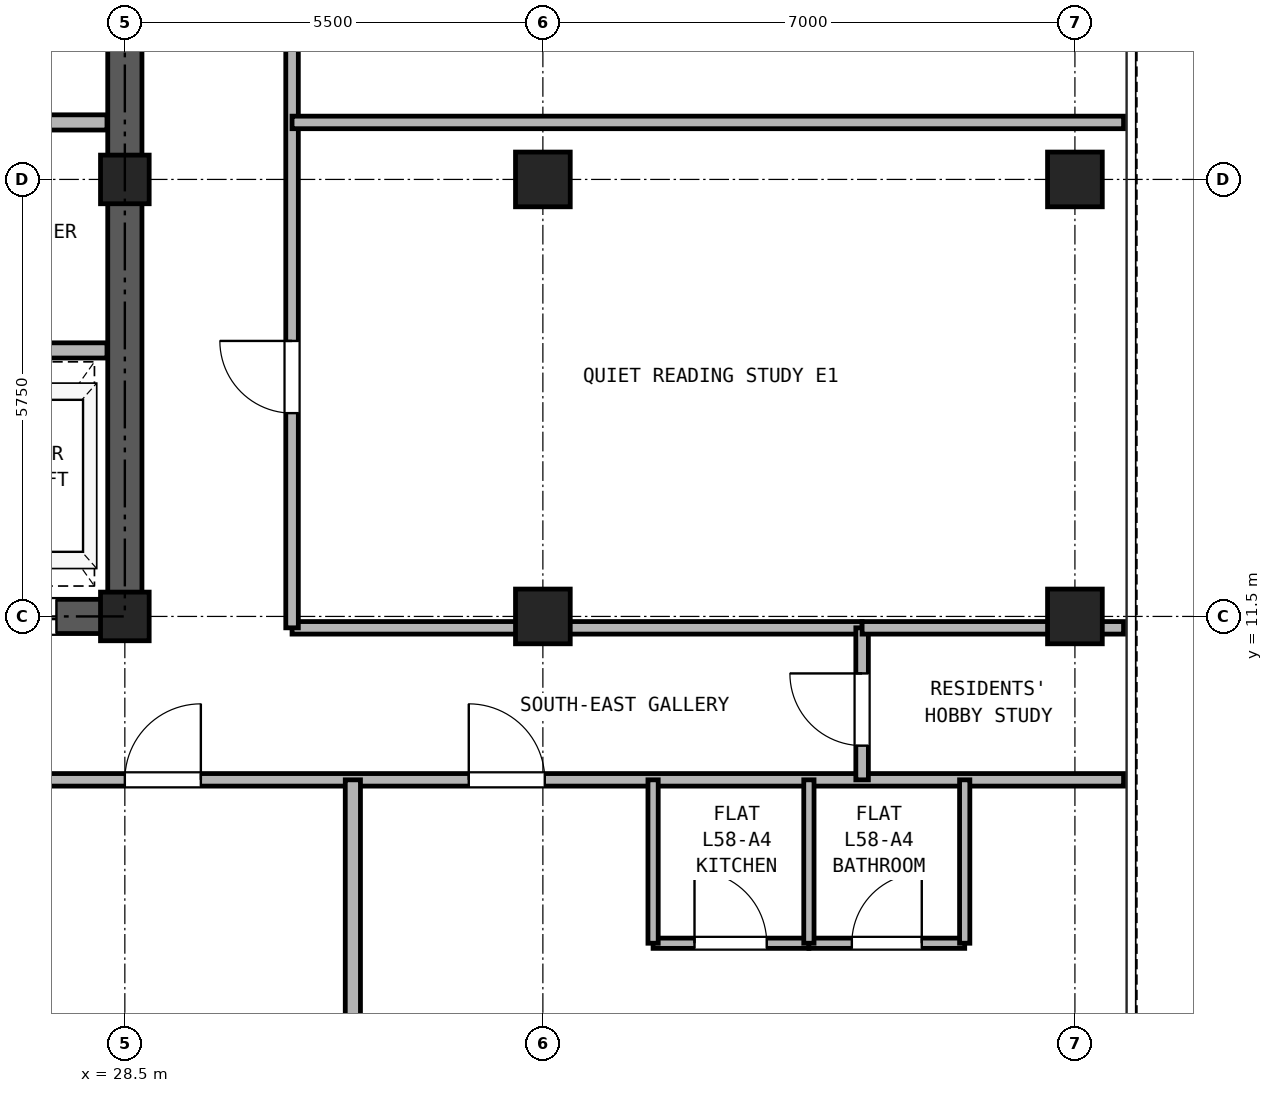
"""IFC4 building model, lengths in metres.
Left out: names, types, materials, properties, quantities, classifications, styles, units other than length and angle.
Written with IfcOpenShell. Run it as: python <this file> out.ifc"""

import sys

from ifc_helpers import new_model, si_unit, direction, frame, frame_2d, origin, origin_2d, place, context, subcontext, project, spatial, rectangle, hollow_rectangle, extrude, source, transform, mapped, element, fill, save


model = new_model("IFC4")
c1 = context("Model", 3, precision=1e-05, world=origin(), true_north=direction((0.0, 1.0)))
c2 = subcontext(c1, "Body", "Model", "MODEL_VIEW")
j1 = project(units=[si_unit("LENGTHUNIT", "METRE"), si_unit("PLANEANGLEUNIT", "RADIAN")], contexts=[c1])
p1 = place(None, origin())
s1 = spatial("IfcSite", under=j1, at=p1, CompositionType="ELEMENT")
p2 = place(p1, origin())
s2 = spatial("IfcBuilding", under=s1, at=p2, CompositionType="ELEMENT")
p3 = place(p2, frame((0.0, 0.0, 206.0)))
s3 = spatial("IfcBuildingStorey", under=s2, at=p3, CompositionType="ELEMENT", Elevation=206.0)
m1 = source(origin(), c2, "Body", "SweptSolid", [
    extrude(hollow_rectangle(XDim=0.72, YDim=0.72, WallThickness=0.04, at=origin_2d()), origin(), (0.0, 0.0, 1.0), 2.95),
])
for number, where, z_axis, x_axis in (
    (1, (41.0, 11.5, 0.0), (0.0, 0.0, 1.0), (1.0, 0.0, 0.0)),
    (2, (41.0, 17.25, 0.0), (0.0, 0.0, 1.0), (1.0, 0.0, 0.0)),
):
    element("IfcColumn", number, at=place(p3, frame(where, z_axis=z_axis, x_axis=x_axis)), inside=s3, PredefinedType="COLUMN", context=c2, shape_type="MappedRepresentation", body=[
        mapped(m1, transform((0.0, 0.0, 0.0), x_axis=(1.0, 0.0, 0.0), y_axis=(0.0, 1.0, 0.0), z_axis=(0.0, 0.0, 1.0), scale=1.0)),
    ])
m2 = source(origin(), c2, "Body", "SweptSolid", [
    extrude(hollow_rectangle(XDim=0.64, YDim=0.64, WallThickness=0.035, at=origin_2d()), origin(), (0.0, 0.0, 1.0), 2.95),
])
for number, where, z_axis, x_axis in (
    (3, (28.5, 11.5, 0.0), (0.0, 0.0, 1.0), (1.0, 0.0, 0.0)),
    (4, (28.5, 17.25, 0.0), (0.0, 0.0, 1.0), (1.0, 0.0, 0.0)),
):
    element("IfcColumn", number, at=place(p3, frame(where, z_axis=z_axis, x_axis=x_axis)), inside=s3, PredefinedType="COLUMN", context=c2, shape_type="MappedRepresentation", body=[
        mapped(m2, transform((0.0, 0.0, 0.0), x_axis=(1.0, 0.0, 0.0), y_axis=(0.0, 1.0, 0.0), z_axis=(0.0, 0.0, 1.0), scale=1.0)),
    ])
for number, where, z_axis, x_axis in (
    (5, (34.0, 11.5, 0.0), (0.0, 0.0, 1.0), (1.0, 0.0, 0.0)),
    (6, (34.0, 17.25, 0.0), (0.0, 0.0, 1.0), (1.0, 0.0, 0.0)),
):
    element("IfcColumn", number, at=place(p3, frame(where, z_axis=z_axis, x_axis=x_axis)), inside=s3, PredefinedType="COLUMN", context=c2, shape_type="MappedRepresentation", body=[
        mapped(m1, transform((0.0, 0.0, 0.0), x_axis=(1.0, 0.0, 0.0), y_axis=(0.0, 1.0, 0.0), z_axis=(0.0, 0.0, 1.0), scale=1.0)),
    ])
p4 = place(p3, frame((18.275, 11.5, 0.0), z_axis=(0.0, 0.0, 1.0), x_axis=(1.0, 0.0, 0.0)))
e7 = element("IfcWall", 7, at=p4, inside=s3, PredefinedType="SHEAR", context=c2, shape_type="SweptSolid", body=[
    extrude(rectangle(XDim=10.45, YDim=0.45, at=frame_2d((5.225, 0.0))), origin(), (0.0, 0.0, 1.0), 2.95),
])
p5 = place(p4, frame((1.825, 0.0, 0.0)))
e8 = element("IfcOpeningElement", 8, at=p5, cuts=e7, PredefinedType="OPENING", context=c2, shape_type="SweptSolid", body=[
    extrude(rectangle(XDim=0.95, YDim=2.15, at=frame_2d((0.475, 1.075))), frame((0.0, 0.235, 0.0), z_axis=(0.0, -1.0, 0.0), x_axis=(1.0, 0.0, 0.0)), (0.0, 0.0, 1.0), 0.47),
])
p6 = place(p4, frame((5.325, 0.0, 0.0)))
e9 = element("IfcOpeningElement", 9, at=p6, cuts=e7, PredefinedType="OPENING", context=c2, shape_type="SweptSolid", body=[
    extrude(rectangle(XDim=0.95, YDim=2.15, at=frame_2d((0.475, 1.075))), frame((0.0, 0.235, 0.0), z_axis=(0.0, -1.0, 0.0), x_axis=(1.0, 0.0, 0.0)), (0.0, 0.0, 1.0), 0.47),
])
p7 = place(p4, frame((8.225, 0.0, 0.0)))
e10 = element("IfcOpeningElement", 10, at=p7, cuts=e7, PredefinedType="OPENING", context=c2, shape_type="SweptSolid", body=[
    extrude(rectangle(XDim=1.1, YDim=2.25, at=frame_2d((0.55, 1.125))), frame((0.0, 0.235, 0.0), z_axis=(0.0, -1.0, 0.0), x_axis=(1.0, 0.0, 0.0)), (0.0, 0.0, 1.0), 0.47),
])
p8 = place(p3, frame((28.5, 11.725, 0.0), z_axis=(0.0, 0.0, 1.0), x_axis=(0.0, 1.0, 0.0)))
e11 = element("IfcWall", 11, at=p8, inside=s3, PredefinedType="SHEAR", context=c2, shape_type="SweptSolid", body=[
    extrude(rectangle(XDim=16.8, YDim=0.45, at=frame_2d((8.4, 0.0))), origin(), (0.0, 0.0, 1.0), 2.95),
])
p9 = place(p8, frame((7.425, 0.0, 0.0)))
e12 = element("IfcOpeningElement", 12, at=p9, cuts=e11, PredefinedType="OPENING", context=c2, shape_type="SweptSolid", body=[
    extrude(rectangle(XDim=1.15, YDim=2.2, at=frame_2d((0.575, 1.1))), frame((0.0, 0.235, 0.0), z_axis=(0.0, -1.0, 0.0), x_axis=(1.0, 0.0, 0.0)), (0.0, 0.0, 1.0), 0.47),
])
p10 = place(p3, frame((18.735, 18.0, 0.0), z_axis=(0.0, 0.0, 1.0), x_axis=(1.0, 0.0, 0.0)))
e13 = element("IfcWall", 13, at=p10, inside=s3, PredefinedType="PARTITIONING", context=c2, shape_type="SweptSolid", body=[
    extrude(rectangle(XDim=9.53, YDim=0.2, at=frame_2d((4.765, 0.0))), origin(), (0.0, 0.0, 1.0), 2.95),
])
p11 = place(p10, frame((0.515, 0.0, 0.0)))
e14 = element("IfcOpeningElement", 14, at=p11, cuts=e13, PredefinedType="OPENING", context=c2, shape_type="SweptSolid", body=[
    extrude(rectangle(XDim=1.3, YDim=2.3, at=frame_2d((0.65, 1.15))), frame((0.0, 0.11, 0.0), z_axis=(0.0, -1.0, 0.0), x_axis=(1.0, 0.0, 0.0)), (0.0, 0.0, 1.0), 0.22),
])
p12 = place(p10, frame((2.615, 0.0, 0.0)))
e15 = element("IfcOpeningElement", 15, at=p12, cuts=e13, PredefinedType="OPENING", context=c2, shape_type="SweptSolid", body=[
    extrude(rectangle(XDim=1.3, YDim=2.3, at=frame_2d((0.65, 1.15))), frame((0.0, 0.11, 0.0), z_axis=(0.0, -1.0, 0.0), x_axis=(1.0, 0.0, 0.0)), (0.0, 0.0, 1.0), 0.22),
])
p13 = place(p10, frame((5.015, 0.0, 0.0)))
e16 = element("IfcOpeningElement", 16, at=p13, cuts=e13, PredefinedType="OPENING", context=c2, shape_type="SweptSolid", body=[
    extrude(rectangle(XDim=0.9, YDim=2.05, at=frame_2d((0.45, 1.025))), frame((0.0, 0.11, 0.0), z_axis=(0.0, -1.0, 0.0), x_axis=(1.0, 0.0, 0.0)), (0.0, 0.0, 1.0), 0.22),
])
p14 = place(p10, frame((7.715, 0.0, 0.0)))
e17 = element("IfcOpeningElement", 17, at=p14, cuts=e13, PredefinedType="OPENING", context=c2, shape_type="SweptSolid", body=[
    extrude(rectangle(XDim=0.9, YDim=2.05, at=frame_2d((0.45, 1.025))), frame((0.0, 0.11, 0.0), z_axis=(0.0, -1.0, 0.0), x_axis=(1.0, 0.0, 0.0)), (0.0, 0.0, 1.0), 0.22),
])
p15 = place(p3, frame((18.735, 15.0, 0.0), z_axis=(0.0, 0.0, 1.0), x_axis=(1.0, 0.0, 0.0)))
e18 = element("IfcWall", 18, at=p15, inside=s3, PredefinedType="PARTITIONING", context=c2, shape_type="SweptSolid", body=[
    extrude(rectangle(XDim=9.53, YDim=0.2, at=frame_2d((4.765, 0.0))), origin(), (0.0, 0.0, 1.0), 2.95),
])
p16 = place(p3, frame((0.16, 9.35, 0.0), z_axis=(0.0, 0.0, 1.0), x_axis=(1.0, 0.0, 0.0)))
e19 = element("IfcWall", 19, at=p16, inside=s3, PredefinedType="PARTITIONING", context=c2, shape_type="SweptSolid", body=[
    extrude(rectangle(XDim=41.48, YDim=0.165, at=frame_2d((20.74, 0.0))), origin(), (0.0, 0.0, 1.0), 2.95),
])
p17 = place(p16, frame((9.64, 0.0, 0.0)))
e20 = element("IfcOpeningElement", 20, at=p17, cuts=e19, PredefinedType="OPENING", context=c2, shape_type="SweptSolid", body=[
    extrude(rectangle(XDim=1.0, YDim=2.15, at=frame_2d((0.5, 1.075))), frame((0.0, 0.093, 0.0), z_axis=(0.0, -1.0, 0.0), x_axis=(1.0, 0.0, 0.0)), (0.0, 0.0, 1.0), 0.185),
])
p18 = place(p16, frame((19.09, 0.0, 0.0)))
e21 = element("IfcOpeningElement", 21, at=p18, cuts=e19, PredefinedType="OPENING", context=c2, shape_type="SweptSolid", body=[
    extrude(rectangle(XDim=1.0, YDim=2.15, at=frame_2d((0.5, 1.075))), frame((0.0, 0.093, 0.0), z_axis=(0.0, -1.0, 0.0), x_axis=(1.0, 0.0, 0.0)), (0.0, 0.0, 1.0), 0.185),
])
p19 = place(p16, frame((28.34, 0.0, 0.0)))
e22 = element("IfcOpeningElement", 22, at=p19, cuts=e19, PredefinedType="OPENING", context=c2, shape_type="SweptSolid", body=[
    extrude(rectangle(XDim=1.0, YDim=2.15, at=frame_2d((0.5, 1.075))), frame((0.0, 0.093, 0.0), z_axis=(0.0, -1.0, 0.0), x_axis=(1.0, 0.0, 0.0)), (0.0, 0.0, 1.0), 0.185),
])
p20 = place(p16, frame((32.865, 0.0, 0.0)))
e23 = element("IfcOpeningElement", 23, at=p20, cuts=e19, PredefinedType="OPENING", context=c2, shape_type="SweptSolid", body=[
    extrude(rectangle(XDim=1.0, YDim=2.15, at=frame_2d((0.5, 1.075))), frame((0.0, 0.093, 0.0), z_axis=(0.0, -1.0, 0.0), x_axis=(1.0, 0.0, 0.0)), (0.0, 0.0, 1.0), 0.185),
])
p21 = place(p3, frame((30.7, 11.35, 0.0), z_axis=(0.0, 0.0, 1.0), x_axis=(1.0, 0.0, 0.0)))
e24 = element("IfcWall", 24, at=p21, inside=s3, PredefinedType="PARTITIONING", context=c2, shape_type="SweptSolid", body=[
    extrude(rectangle(XDim=7.5, YDim=0.165, at=frame_2d((3.75, 0.0))), origin(), (0.0, 0.0, 1.0), 2.323),
])
p22 = place(p3, frame((38.2, 9.35, 0.0), z_axis=(0.0, 0.0, 1.0), x_axis=(0.0, 1.0, 0.0)))
e25 = element("IfcWall", 25, at=p22, inside=s3, PredefinedType="PARTITIONING", context=c2, shape_type="SweptSolid", body=[
    extrude(rectangle(XDim=2.0, YDim=0.165, at=frame_2d((1.0, 0.0))), origin(), (0.0, 0.0, 1.0), 2.95),
])
p23 = place(p22, frame((0.45, 0.0, 0.0)))
e26 = element("IfcOpeningElement", 26, at=p23, cuts=e25, PredefinedType="OPENING", context=c2, shape_type="SweptSolid", body=[
    extrude(rectangle(XDim=0.95, YDim=2.15, at=frame_2d((0.475, 1.075))), frame((0.0, 0.093, 0.0), z_axis=(0.0, -1.0, 0.0), x_axis=(1.0, 0.0, 0.0)), (0.0, 0.0, 1.0), 0.185),
])
p24 = place(p3, frame((30.7, 11.35, 0.0), z_axis=(0.0, 0.0, 1.0), x_axis=(0.0, 1.0, 0.0)))
e27 = element("IfcWall", 27, at=p24, inside=s3, PredefinedType="PARTITIONING", context=c2, shape_type="SweptSolid", body=[
    extrude(rectangle(XDim=23.79, YDim=0.165, at=frame_2d((11.895, 0.0))), origin(), (0.0, 0.0, 1.0), 2.95),
])
p25 = place(p24, frame((2.825, 0.0, 0.0)))
e28 = element("IfcOpeningElement", 28, at=p25, cuts=e27, PredefinedType="OPENING", context=c2, shape_type="SweptSolid", body=[
    extrude(rectangle(XDim=0.95, YDim=2.15, at=frame_2d((0.475, 1.075))), frame((0.0, 0.093, 0.0), z_axis=(0.0, -1.0, 0.0), x_axis=(1.0, 0.0, 0.0)), (0.0, 0.0, 1.0), 0.185),
])
p26 = place(p24, frame((9.4, 0.0, 0.0)))
e29 = element("IfcOpeningElement", 29, at=p26, cuts=e27, PredefinedType="OPENING", context=c2, shape_type="SweptSolid", body=[
    extrude(rectangle(XDim=0.95, YDim=2.15, at=frame_2d((0.475, 1.075))), frame((0.0, 0.093, 0.0), z_axis=(0.0, -1.0, 0.0), x_axis=(1.0, 0.0, 0.0)), (0.0, 0.0, 1.0), 0.185),
])
p27 = place(p24, frame((15.5, 0.0, 0.0)))
e30 = element("IfcOpeningElement", 30, at=p27, cuts=e27, PredefinedType="OPENING", context=c2, shape_type="SweptSolid", body=[
    extrude(rectangle(XDim=0.95, YDim=2.15, at=frame_2d((0.475, 1.075))), frame((0.0, 0.093, 0.0), z_axis=(0.0, -1.0, 0.0), x_axis=(1.0, 0.0, 0.0)), (0.0, 0.0, 1.0), 0.185),
])
p28 = place(p24, frame((20.82, 0.0, 0.0)))
e31 = element("IfcOpeningElement", 31, at=p28, cuts=e27, PredefinedType="OPENING", context=c2, shape_type="SweptSolid", body=[
    extrude(rectangle(XDim=0.95, YDim=2.15, at=frame_2d((0.475, 1.075))), frame((0.0, 0.093, 0.0), z_axis=(0.0, -1.0, 0.0), x_axis=(1.0, 0.0, 0.0)), (0.0, 0.0, 1.0), 0.185),
])
p29 = place(p3, frame((31.5, 0.16, 0.0), z_axis=(0.0, 0.0, 1.0), x_axis=(0.0, 1.0, 0.0)))
e32 = element("IfcWall", 32, at=p29, inside=s3, PredefinedType="PARTITIONING", context=c2, shape_type="SweptSolid", body=[
    extrude(rectangle(XDim=9.19, YDim=0.2, at=frame_2d((4.595, 0.0))), origin(), (0.0, 0.0, 1.0), 2.95),
])
p30 = place(p3, frame((35.45, 7.2, 0.0), z_axis=(0.0, 0.0, 1.0), x_axis=(1.0, 0.0, 0.0)))
e33 = element("IfcWall", 33, at=p30, inside=s3, PredefinedType="PARTITIONING", context=c2, shape_type="SweptSolid", body=[
    extrude(rectangle(XDim=2.05, YDim=0.135, at=frame_2d((1.025, 0.0))), origin(), (0.0, 0.0, 1.0), 2.95),
])
p31 = place(p30, frame((0.545, 0.0, 0.0)))
e34 = element("IfcOpeningElement", 34, at=p31, cuts=e33, PredefinedType="OPENING", context=c2, shape_type="SweptSolid", body=[
    extrude(rectangle(XDim=0.95, YDim=2.15, at=frame_2d((0.475, 1.075))), frame((0.0, 0.077, 0.0), z_axis=(0.0, -1.0, 0.0), x_axis=(1.0, 0.0, 0.0)), (0.0, 0.0, 1.0), 0.155),
])
p32 = place(p3, frame((37.5, 7.2, 0.0), z_axis=(0.0, 0.0, 1.0), x_axis=(1.0, 0.0, 0.0)))
e35 = element("IfcWall", 35, at=p32, inside=s3, PredefinedType="PARTITIONING", context=c2, shape_type="SweptSolid", body=[
    extrude(rectangle(XDim=2.05, YDim=0.135, at=frame_2d((1.025, 0.0))), origin(), (0.0, 0.0, 1.0), 2.95),
])
p33 = place(p32, frame((0.565, 0.0, 0.0)))
e36 = element("IfcOpeningElement", 36, at=p33, cuts=e35, PredefinedType="OPENING", context=c2, shape_type="SweptSolid", body=[
    extrude(rectangle(XDim=0.92, YDim=2.1, at=frame_2d((0.46, 1.05))), frame((0.0, 0.077, 0.0), z_axis=(0.0, -1.0, 0.0), x_axis=(1.0, 0.0, 0.0)), (0.0, 0.0, 1.0), 0.155),
])
for number, where, z_axis, x_axis in (
    (37, (35.45, 7.2, 0.0), (0.0, 0.0, 1.0), (0.0, 1.0, 0.0)),
    (38, (37.5, 7.2, 0.0), (0.0, 0.0, 1.0), (0.0, 1.0, 0.0)),
    (39, (39.55, 7.2, 0.0), (0.0, 0.0, 1.0), (0.0, 1.0, 0.0)),
):
    element("IfcWall", number, at=place(p3, frame(where, z_axis=z_axis, x_axis=x_axis)), inside=s3, PredefinedType="PARTITIONING", context=c2, shape_type="SweptSolid", body=[
        extrude(rectangle(XDim=2.15, YDim=0.135, at=frame_2d((1.075, 0.0))), origin(), (0.0, 0.0, 1.0), 2.95),
    ])
p34 = place(p3, frame((38.2, 11.35, 0.0), z_axis=(0.0, 0.0, 1.0), x_axis=(1.0, 0.0, 0.0)))
e40 = element("IfcWall", 40, at=p34, inside=s3, PredefinedType="PARTITIONING", context=c2, shape_type="SweptSolid", body=[
    extrude(rectangle(XDim=3.44, YDim=0.165, at=frame_2d((1.72, 0.0))), origin(), (0.0, 0.0, 1.0), 2.323),
])
p35 = place(p3, frame((30.7, 18.0, 0.0), z_axis=(0.0, 0.0, 1.0), x_axis=(1.0, 0.0, 0.0)))
e41 = element("IfcWall", 41, at=p35, inside=s3, PredefinedType="PARTITIONING", context=c2, shape_type="SweptSolid", body=[
    extrude(rectangle(XDim=10.94, YDim=0.165, at=frame_2d((5.47, 0.0))), origin(), (0.0, 0.0, 1.0), 2.95),
])
p36 = place(p7, frame((1.1, 0.0, 0.0), z_axis=(0.0, 0.0, 1.0), x_axis=(-1.0, 0.0, 0.0)))
e42 = element("IfcDoor", 42, at=p36, inside=s3, OperationType="DOUBLE_DOOR_SLIDING", PredefinedType="DOOR", context=c2, shape_type="SweptSolid", body=[
    extrude(rectangle(XDim=1.1, YDim=2.25, at=frame_2d((0.55, 1.125))), frame((0.0, 0.025, 0.0), z_axis=(0.0, -1.0, 0.0), x_axis=(1.0, 0.0, 0.0)), (0.0, 0.0, 1.0), 0.05),
])
fill(e10, e42)
p37 = place(p19, frame((1.0, 0.0, 0.0), z_axis=(0.0, 0.0, 1.0), x_axis=(-1.0, 0.0, 0.0)))
e43 = element("IfcDoor", 43, at=p37, inside=s3, OperationType="SINGLE_SWING_RIGHT", PredefinedType="DOOR", context=c2, shape_type="SweptSolid", body=[
    extrude(rectangle(XDim=1.0, YDim=2.15, at=frame_2d((0.5, 1.075))), frame((0.0, 0.025, 0.0), z_axis=(0.0, -1.0, 0.0), x_axis=(1.0, 0.0, 0.0)), (0.0, 0.0, 1.0), 0.05),
])
fill(e22, e43)
p38 = place(p31, origin())
e44 = element("IfcDoor", 44, at=p38, inside=s3, OperationType="SINGLE_SWING_LEFT", PredefinedType="DOOR", context=c2, shape_type="SweptSolid", body=[
    extrude(rectangle(XDim=0.95, YDim=2.15, at=frame_2d((0.475, 1.075))), frame((0.0, 0.025, 0.0), z_axis=(0.0, -1.0, 0.0), x_axis=(1.0, 0.0, 0.0)), (0.0, 0.0, 1.0), 0.05),
])
fill(e34, e44)
p39 = place(p33, origin())
e45 = element("IfcDoor", 45, at=p39, inside=s3, OperationType="SINGLE_SWING_RIGHT", PredefinedType="DOOR", context=c2, shape_type="SweptSolid", body=[
    extrude(rectangle(XDim=0.92, YDim=2.1, at=frame_2d((0.46, 1.05))), frame((0.0, 0.025, 0.0), z_axis=(0.0, -1.0, 0.0), x_axis=(1.0, 0.0, 0.0)), (0.0, 0.0, 1.0), 0.05),
])
fill(e36, e45)
p40 = place(p20, frame((1.0, 0.0, 0.0), z_axis=(0.0, 0.0, 1.0), x_axis=(-1.0, 0.0, 0.0)))
e46 = element("IfcDoor", 46, at=p40, inside=s3, OperationType="SINGLE_SWING_LEFT", PredefinedType="DOOR", context=c2, shape_type="SweptSolid", body=[
    extrude(rectangle(XDim=1.0, YDim=2.15, at=frame_2d((0.5, 1.075))), frame((0.0, 0.025, 0.0), z_axis=(0.0, -1.0, 0.0), x_axis=(1.0, 0.0, 0.0)), (0.0, 0.0, 1.0), 0.05),
])
fill(e23, e46)
p41 = place(p23, origin())
e47 = element("IfcDoor", 47, at=p41, inside=s3, OperationType="SINGLE_SWING_RIGHT", PredefinedType="DOOR", context=c2, shape_type="SweptSolid", body=[
    extrude(rectangle(XDim=0.95, YDim=2.15, at=frame_2d((0.475, 1.075))), frame((0.0, 0.025, 0.0), z_axis=(0.0, -1.0, 0.0), x_axis=(1.0, 0.0, 0.0)), (0.0, 0.0, 1.0), 0.05),
])
fill(e26, e47)
p42 = place(p25, origin())
e48 = element("IfcDoor", 48, at=p42, inside=s3, OperationType="SINGLE_SWING_RIGHT", PredefinedType="DOOR", context=c2, shape_type="SweptSolid", body=[
    extrude(rectangle(XDim=0.95, YDim=2.15, at=frame_2d((0.475, 1.075))), frame((0.0, 0.025, 0.0), z_axis=(0.0, -1.0, 0.0), x_axis=(1.0, 0.0, 0.0)), (0.0, 0.0, 1.0), 0.05),
])
fill(e28, e48)
save(model, sys.argv[1])
